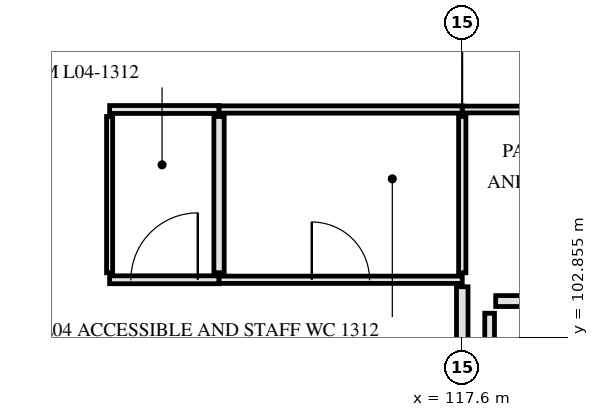
"""IFC4 building model, lengths in metres.
Left out: names, types, materials, properties, quantities, classifications, styles, units other than length and angle.
Written with IfcOpenShell. Run it as: python <this file> out.ifc"""

import sys

from ifc_helpers import new_model, si_unit, direction, frame, frame_2d, origin, place, context, subcontext, project, spatial, rectangle, extrude, element, fill, save


model = new_model("IFC4")
c1 = context("Model", 3, precision=1e-05, world=origin(), true_north=direction((0.0, 1.0)))
c2 = subcontext(c1, "Body", "Model", "MODEL_VIEW")
j1 = project(units=[si_unit("LENGTHUNIT", "METRE"), si_unit("PLANEANGLEUNIT", "RADIAN")], contexts=[c1])
p1 = place(None, origin())
s1 = spatial("IfcSite", under=j1, at=p1, CompositionType="ELEMENT")
p2 = place(p1, origin())
s2 = spatial("IfcBuilding", under=s1, at=p2, CompositionType="ELEMENT")
p3 = place(p2, frame((0.0, 0.0, 18.6)))
s3 = spatial("IfcBuildingStorey", under=s2, at=p3, CompositionType="ELEMENT", Elevation=18.6)
p4 = place(p3, frame((118.15, 103.45, 0.0), z_axis=(0.0, 0.0, 1.0), x_axis=(1.0, 0.0, 0.0)))
e1 = element("IfcWall", 1, at=p4, inside=s3, PredefinedType="PARTITIONING", context=c2, shape_type="SweptSolid", body=[
    extrude(rectangle(XDim=7.85, YDim=0.18, at=frame_2d((3.925, 0.0))), origin(), (0.0, 0.0, 1.0), 3.26),
])
p5 = place(p4, frame((3.055, 0.0, 0.0)))
e2 = element("IfcOpeningElement", 2, at=p5, cuts=e1, PredefinedType="OPENING", context=c2, shape_type="SweptSolid", body=[
    extrude(rectangle(XDim=1.74, YDim=2.24, at=frame_2d((0.87, 1.12))), frame((0.0, 0.1, 0.0), z_axis=(0.0, -1.0, 0.0), x_axis=(1.0, 0.0, 0.0)), (0.0, 0.0, 1.0), 0.2),
])
p6 = place(p3, frame((111.8, 103.8, 0.0), z_axis=(0.0, 0.0, 1.0), x_axis=(1.0, 0.0, 0.0)))
e3 = element("IfcWall", 3, at=p6, inside=s3, PredefinedType="PARTITIONING", context=c2, shape_type="SweptSolid", body=[
    extrude(rectangle(XDim=1.8, YDim=0.13, at=frame_2d((0.9, 0.0))), origin(), (0.0, 0.0, 1.0), 3.61),
])
p7 = place(p6, frame((0.35, 0.0, 0.0)))
e4 = element("IfcOpeningElement", 4, at=p7, cuts=e3, PredefinedType="OPENING", context=c2, shape_type="SweptSolid", body=[
    extrude(rectangle(XDim=1.1, YDim=2.15, at=frame_2d((0.55, 1.075))), frame((0.0, 0.075, 0.0), z_axis=(0.0, -1.0, 0.0), x_axis=(1.0, 0.0, 0.0)), (0.0, 0.0, 1.0), 0.15),
])
p8 = place(p3, frame((113.6, 103.8, 0.0), z_axis=(0.0, 0.0, 1.0), x_axis=(1.0, 0.0, 0.0)))
e5 = element("IfcWall", 5, at=p8, inside=s3, PredefinedType="PARTITIONING", context=c2, shape_type="SweptSolid", body=[
    extrude(rectangle(XDim=4.0, YDim=0.12, at=frame_2d((2.0, 0.0))), origin(), (0.0, 0.0, 1.0), 3.26),
])
p9 = place(p8, frame((1.525, 0.0, 0.0)))
e6 = element("IfcOpeningElement", 6, at=p9, cuts=e5, PredefinedType="OPENING", context=c2, shape_type="SweptSolid", body=[
    extrude(rectangle(XDim=0.95, YDim=2.1, at=frame_2d((0.475, 1.05))), frame((0.0, 0.07, 0.0), z_axis=(0.0, -1.0, 0.0), x_axis=(1.0, 0.0, 0.0)), (0.0, 0.0, 1.0), 0.14),
])
p10 = place(p3, frame((111.8, 106.6, 0.0), z_axis=(0.0, 0.0, 1.0), x_axis=(1.0, 0.0, 0.0)))
e7 = element("IfcWall", 7, at=p10, inside=s3, PredefinedType="PARTITIONING", context=c2, shape_type="SweptSolid", body=[
    extrude(rectangle(XDim=1.8, YDim=0.13, at=frame_2d((0.9, 0.0))), origin(), (0.0, 0.0, 1.0), 3.61),
])
p11 = place(p3, frame((113.6, 106.6, 0.0), z_axis=(0.0, 0.0, 1.0), x_axis=(1.0, 0.0, 0.0)))
e8 = element("IfcWall", 8, at=p11, inside=s3, PredefinedType="PARTITIONING", context=c2, shape_type="SweptSolid", body=[
    extrude(rectangle(XDim=4.0, YDim=0.12, at=frame_2d((2.0, 0.0))), origin(), (0.0, 0.0, 1.0), 3.26),
])
p12 = place(p3, frame((117.6, 106.6, 0.0), z_axis=(0.0, 0.0, 1.0), x_axis=(1.0, 0.0, 0.0)))
e9 = element("IfcWall", 9, at=p12, inside=s3, PredefinedType="PARTITIONING", context=c2, shape_type="SweptSolid", body=[
    extrude(rectangle(XDim=8.4, YDim=0.112, at=frame_2d((4.2, 0.0))), origin(), (0.0, 0.0, 1.0), 3.26),
])
p13 = place(p3, frame((111.8, 103.915, 0.0), z_axis=(0.0, 0.0, 1.0), x_axis=(0.0, 1.0, 0.0)))
e10 = element("IfcWall", 10, at=p13, inside=s3, PredefinedType="PARTITIONING", context=c2, shape_type="SweptSolid", body=[
    extrude(rectangle(XDim=2.57, YDim=0.1, at=frame_2d((1.285, 0.0))), origin(), (0.0, 0.0, 1.0), 3.31),
])
p14 = place(p3, frame((113.6, 103.915, 0.0), z_axis=(0.0, 0.0, 1.0), x_axis=(0.0, 1.0, 0.0)))
e11 = element("IfcWall", 11, at=p14, inside=s3, PredefinedType="PARTITIONING", context=c2, shape_type="SweptSolid", body=[
    extrude(rectangle(XDim=2.57, YDim=0.17, at=frame_2d((1.285, 0.0))), origin(), (0.0, 0.0, 1.0), 3.31),
])
p15 = place(p3, frame((117.6, 101.095, 0.0), z_axis=(0.0, 0.0, 1.0), x_axis=(0.0, 1.0, 0.0)))
e12 = element("IfcWall", 12, at=p15, inside=s3, PredefinedType="PARTITIONING", context=c2, shape_type="SweptSolid", body=[
    extrude(rectangle(XDim=2.59, YDim=0.19, at=frame_2d((1.295, 0.0))), origin(), (0.0, 0.0, 1.0), 3.26),
])
p16 = place(p3, frame((117.6, 103.915, 0.0), z_axis=(0.0, 0.0, 1.0), x_axis=(0.0, 1.0, 0.0)))
e13 = element("IfcWall", 13, at=p16, inside=s3, PredefinedType="PARTITIONING", context=c2, shape_type="SweptSolid", body=[
    extrude(rectangle(XDim=2.57, YDim=0.12, at=frame_2d((1.285, 0.0))), origin(), (0.0, 0.0, 1.0), 3.26),
])
p17 = place(p3, frame((118.05, 101.365, 0.0), z_axis=(0.0, 0.0, 1.0), x_axis=(0.0, 1.0, 0.0)))
e14 = element("IfcWall", 14, at=p17, inside=s3, PredefinedType="PARTITIONING", context=c2, shape_type="SweptSolid", body=[
    extrude(rectangle(XDim=1.885, YDim=0.16, at=frame_2d((0.942, 0.0))), origin(), (0.0, 0.0, 1.0), 3.61),
])
p18 = place(p7, origin())
e15 = element("IfcDoor", 15, at=p18, inside=s3, OperationType="SINGLE_SWING_RIGHT", PredefinedType="DOOR", context=c2, shape_type="SweptSolid", body=[
    extrude(rectangle(XDim=1.1, YDim=2.15, at=frame_2d((0.55, 1.075))), frame((0.0, 0.025, 0.0), z_axis=(0.0, -1.0, 0.0), x_axis=(1.0, 0.0, 0.0)), (0.0, 0.0, 1.0), 0.05),
])
fill(e4, e15)
p19 = place(p9, origin())
e16 = element("IfcDoor", 16, at=p19, inside=s3, OperationType="SINGLE_SWING_LEFT", PredefinedType="DOOR", context=c2, shape_type="SweptSolid", body=[
    extrude(rectangle(XDim=0.95, YDim=2.1, at=frame_2d((0.475, 1.05))), frame((0.0, 0.025, 0.0), z_axis=(0.0, -1.0, 0.0), x_axis=(1.0, 0.0, 0.0)), (0.0, 0.0, 1.0), 0.05),
])
fill(e6, e16)
save(model, sys.argv[1])
